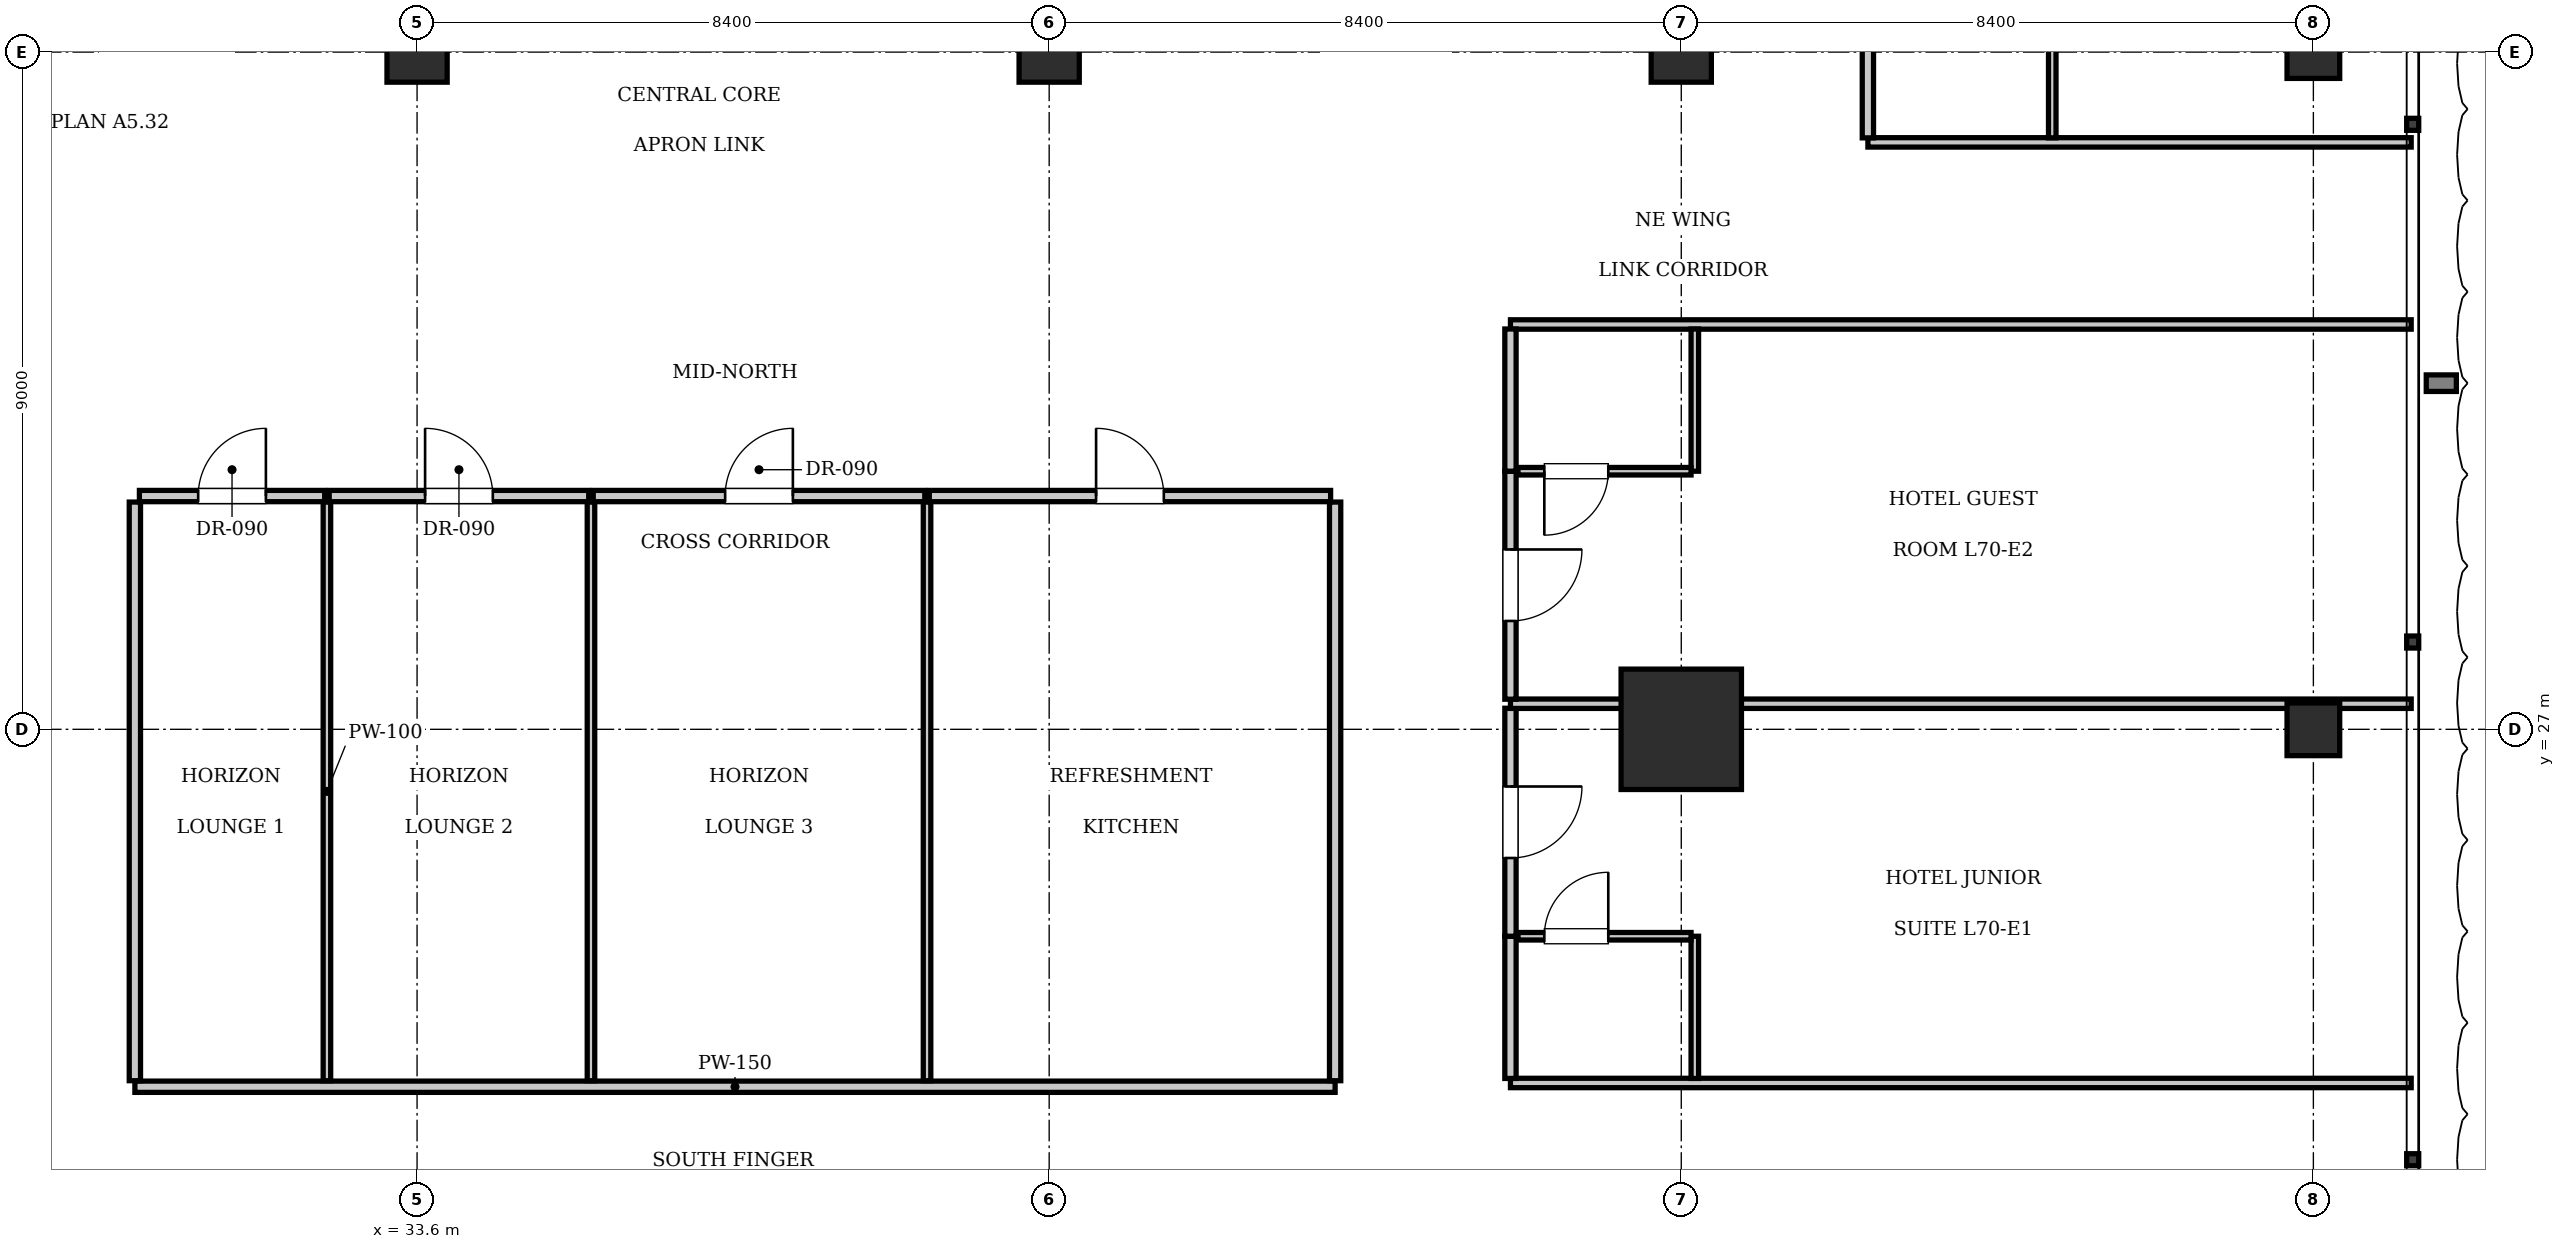
"""IFC4 building model, lengths in metres.
Left out: names, types, materials, properties, quantities, classifications, styles, units other than length and angle.
Written with IfcOpenShell. Run it as: python <this file> out.ifc"""

import sys

from ifc_helpers import new_model, si_unit, direction, frame, frame_2d, origin, origin_2d, place, context, subcontext, project, spatial, rectangle, extrude, element, fill, save


model = new_model("IFC4")
c1 = context("Model", 3, precision=1e-05, world=origin(), true_north=direction((0.0, 1.0)))
c2 = subcontext(c1, "Body", "Model", "MODEL_VIEW")
j1 = project(units=[si_unit("LENGTHUNIT", "METRE"), si_unit("PLANEANGLEUNIT", "RADIAN")], contexts=[c1])
p1 = place(None, origin())
s1 = spatial("IfcSite", under=j1, at=p1, CompositionType="ELEMENT")
p2 = place(p1, origin())
s2 = spatial("IfcBuilding", under=s1, at=p2, CompositionType="ELEMENT")
p3 = place(p2, frame((0.0, 0.0, 285.6)))
s3 = spatial("IfcBuildingStorey", under=s2, at=p3, CompositionType="ELEMENT", Elevation=285.6)
p4 = place(p3, frame((50.4, 27.0, 0.0), z_axis=(0.0, 0.0, 1.0), x_axis=(1.0, 0.0, 0.0)))
e1 = element("IfcColumn", 1, at=p4, inside=s3, PredefinedType="COLUMN", context=c2, shape_type="SweptSolid", body=[
    extrude(rectangle(XDim=1.6, YDim=1.6, at=origin_2d()), origin(), (0.0, 0.0, 1.0), 3.85),
])
for number, where, z_axis, x_axis in (
    (2, (33.6, 36.0, 0.0), (0.0, 0.0, 1.0), (1.0, 0.0, 0.0)),
    (3, (42.0, 36.0, 0.0), (0.0, 0.0, 1.0), (1.0, 0.0, 0.0)),
    (4, (50.4, 36.0, 0.0), (0.0, 0.0, 1.0), (1.0, 0.0, 0.0)),
):
    element("IfcColumn", number, at=place(p3, frame(where, z_axis=z_axis, x_axis=x_axis)), inside=s3, PredefinedType="COLUMN", context=c2, shape_type="SweptSolid", body=[
        extrude(rectangle(XDim=0.8, YDim=0.8, at=origin_2d()), origin(), (0.0, 0.0, 1.0), 3.85),
    ])
for number, where, z_axis, x_axis in (
    (5, (58.8, 27.0, 0.0), (0.0, 0.0, 1.0), (1.0, 0.0, 0.0)),
    (6, (58.8, 36.0, 0.0), (0.0, 0.0, 1.0), (1.0, 0.0, 0.0)),
):
    element("IfcColumn", number, at=place(p3, frame(where, z_axis=z_axis, x_axis=x_axis)), inside=s3, PredefinedType="COLUMN", context=c2, shape_type="SweptSolid", body=[
        extrude(rectangle(XDim=0.7, YDim=0.7, at=origin_2d()), origin(), (0.0, 0.0, 1.0), 3.85),
    ])
p5 = place(p3, frame((29.85, 22.25, 0.0), z_axis=(0.0, 0.0, 1.0), x_axis=(1.0, 0.0, 0.0)))
e7 = element("IfcWall", 7, at=p5, inside=s3, PredefinedType="PARTITIONING", context=c2, shape_type="SweptSolid", body=[
    extrude(rectangle(XDim=15.95, YDim=0.15, at=frame_2d((7.975, 0.0))), origin(), (0.0, 0.0, 1.0), 3.61),
])
for number, where, z_axis, x_axis in (
    (8, (29.85, 22.33, 0.0), (0.0, 0.0, 1.0), (0.0, 1.0, 0.0)),
    (9, (45.8, 22.33, 0.0), (0.0, 0.0, 1.0), (0.0, 1.0, 0.0)),
):
    element("IfcWall", number, at=place(p3, frame(where, z_axis=z_axis, x_axis=x_axis)), inside=s3, PredefinedType="PARTITIONING", context=c2, shape_type="SweptSolid", body=[
        extrude(rectangle(XDim=7.69, YDim=0.15, at=frame_2d((3.845, 0.0))), origin(), (0.0, 0.0, 1.0), 3.61),
    ])
p6 = place(p3, frame((29.91, 30.1, 0.0), z_axis=(0.0, 0.0, 1.0), x_axis=(1.0, 0.0, 0.0)))
e10 = element("IfcWall", 10, at=p6, inside=s3, PredefinedType="PARTITIONING", context=c2, shape_type="SweptSolid", body=[
    extrude(rectangle(XDim=2.462, YDim=0.15, at=frame_2d((1.231, 0.0))), origin(), (0.0, 0.0, 1.0), 3.61),
])
p7 = place(p6, frame((0.781, 0.0, 0.0)))
e11 = element("IfcOpeningElement", 11, at=p7, cuts=e10, PredefinedType="OPENING", context=c2, shape_type="SweptSolid", body=[
    extrude(rectangle(XDim=0.9, YDim=2.1, at=frame_2d((0.45, 1.05))), frame((0.0, 0.085, 0.0), z_axis=(0.0, -1.0, 0.0), x_axis=(1.0, 0.0, 0.0)), (0.0, 0.0, 1.0), 0.17),
])
p8 = place(p3, frame((32.402, 22.33, 0.0), z_axis=(0.0, 0.0, 1.0), x_axis=(0.0, 1.0, 0.0)))
e12 = element("IfcWall", 12, at=p8, inside=s3, PredefinedType="PARTITIONING", context=c2, shape_type="SweptSolid", body=[
    extrude(rectangle(XDim=7.69, YDim=0.1, at=frame_2d((3.845, 0.0))), origin(), (0.0, 0.0, 1.0), 3.61),
])
p9 = place(p3, frame((32.432, 30.1, 0.0), z_axis=(0.0, 0.0, 1.0), x_axis=(1.0, 0.0, 0.0)))
e13 = element("IfcWall", 13, at=p9, inside=s3, PredefinedType="PARTITIONING", context=c2, shape_type="SweptSolid", body=[
    extrude(rectangle(XDim=3.449, YDim=0.15, at=frame_2d((1.725, 0.0))), origin(), (0.0, 0.0, 1.0), 3.61),
])
p10 = place(p9, frame((1.274, 0.0, 0.0)))
e14 = element("IfcOpeningElement", 14, at=p10, cuts=e13, PredefinedType="OPENING", context=c2, shape_type="SweptSolid", body=[
    extrude(rectangle(XDim=0.9, YDim=2.1, at=frame_2d((0.45, 1.05))), frame((0.0, 0.085, 0.0), z_axis=(0.0, -1.0, 0.0), x_axis=(1.0, 0.0, 0.0)), (0.0, 0.0, 1.0), 0.17),
])
p11 = place(p3, frame((35.911, 22.33, 0.0), z_axis=(0.0, 0.0, 1.0), x_axis=(0.0, 1.0, 0.0)))
e15 = element("IfcWall", 15, at=p11, inside=s3, PredefinedType="PARTITIONING", context=c2, shape_type="SweptSolid", body=[
    extrude(rectangle(XDim=7.69, YDim=0.1, at=frame_2d((3.845, 0.0))), origin(), (0.0, 0.0, 1.0), 3.61),
])
p12 = place(p3, frame((35.941, 30.1, 0.0), z_axis=(0.0, 0.0, 1.0), x_axis=(1.0, 0.0, 0.0)))
e16 = element("IfcWall", 16, at=p12, inside=s3, PredefinedType="PARTITIONING", context=c2, shape_type="SweptSolid", body=[
    extrude(rectangle(XDim=4.406, YDim=0.15, at=frame_2d((2.203, 0.0))), origin(), (0.0, 0.0, 1.0), 3.61),
])
p13 = place(p12, frame((1.753, 0.0, 0.0)))
e17 = element("IfcOpeningElement", 17, at=p13, cuts=e16, PredefinedType="OPENING", context=c2, shape_type="SweptSolid", body=[
    extrude(rectangle(XDim=0.9, YDim=2.1, at=frame_2d((0.45, 1.05))), frame((0.0, 0.085, 0.0), z_axis=(0.0, -1.0, 0.0), x_axis=(1.0, 0.0, 0.0)), (0.0, 0.0, 1.0), 0.17),
])
p14 = place(p3, frame((40.377, 22.33, 0.0), z_axis=(0.0, 0.0, 1.0), x_axis=(0.0, 1.0, 0.0)))
e18 = element("IfcWall", 18, at=p14, inside=s3, PredefinedType="PARTITIONING", context=c2, shape_type="SweptSolid", body=[
    extrude(rectangle(XDim=7.69, YDim=0.1, at=frame_2d((3.845, 0.0))), origin(), (0.0, 0.0, 1.0), 3.61),
])
p15 = place(p3, frame((40.407, 30.1, 0.0), z_axis=(0.0, 0.0, 1.0), x_axis=(1.0, 0.0, 0.0)))
e19 = element("IfcWall", 19, at=p15, inside=s3, PredefinedType="PARTITIONING", context=c2, shape_type="SweptSolid", body=[
    extrude(rectangle(XDim=5.333, YDim=0.15, at=frame_2d((2.667, 0.0))), origin(), (0.0, 0.0, 1.0), 3.61),
])
p16 = place(p15, frame((2.217, 0.0, 0.0)))
e20 = element("IfcOpeningElement", 20, at=p16, cuts=e19, PredefinedType="OPENING", context=c2, shape_type="SweptSolid", body=[
    extrude(rectangle(XDim=0.9, YDim=2.1, at=frame_2d((0.45, 1.05))), frame((0.0, 0.085, 0.0), z_axis=(0.0, -1.0, 0.0), x_axis=(1.0, 0.0, 0.0)), (0.0, 0.0, 1.0), 0.17),
])
for number, where, z_axis, x_axis in (
    (21, (48.13, 22.3, 0.0), (0.0, 0.0, 1.0), (1.0, 0.0, 0.0)),
    (22, (48.13, 32.38, 0.0), (0.0, 0.0, 1.0), (1.0, 0.0, 0.0)),
):
    element("IfcWall", number, at=place(p3, frame(where, z_axis=z_axis, x_axis=x_axis)), inside=s3, PredefinedType="PARTITIONING", context=c2, shape_type="SweptSolid", body=[
        extrude(rectangle(XDim=11.97, YDim=0.125, at=frame_2d((5.985, 0.0))), origin(), (0.0, 0.0, 1.0), 3.61),
    ])
p17 = place(p3, frame((48.13, 22.36, 0.0), z_axis=(0.0, 0.0, 1.0), x_axis=(0.0, 1.0, 0.0)))
e23 = element("IfcWall", 23, at=p17, inside=s3, PredefinedType="PARTITIONING", context=c2, shape_type="SweptSolid", body=[
    extrude(rectangle(XDim=1.89, YDim=0.15, at=frame_2d((0.945, 0.0))), origin(), (0.0, 0.0, 1.0), 3.61),
])
p18 = place(p3, frame((48.13, 24.25, 0.0), z_axis=(0.0, 0.0, 1.0), x_axis=(0.0, 1.0, 0.0)))
e24 = element("IfcWall", 24, at=p18, inside=s3, PredefinedType="PARTITIONING", context=c2, shape_type="SweptSolid", body=[
    extrude(rectangle(XDim=3.03, YDim=0.15, at=frame_2d((1.515, 0.0))), origin(), (0.0, 0.0, 1.0), 3.61),
])
p19 = place(p18, frame((1.04, 0.0, 0.0)))
e25 = element("IfcOpeningElement", 25, at=p19, cuts=e24, PredefinedType="OPENING", context=c2, shape_type="SweptSolid", body=[
    extrude(rectangle(XDim=0.95, YDim=2.15, at=frame_2d((0.475, 1.075))), frame((0.0, 0.085, 0.0), z_axis=(0.0, -1.0, 0.0), x_axis=(1.0, 0.0, 0.0)), (0.0, 0.0, 1.0), 0.17),
])
p20 = place(p3, frame((50.58, 22.36, 0.0), z_axis=(0.0, 0.0, 1.0), x_axis=(0.0, 1.0, 0.0)))
e26 = element("IfcWall", 26, at=p20, inside=s3, PredefinedType="PARTITIONING", context=c2, shape_type="SweptSolid", body=[
    extrude(rectangle(XDim=1.89, YDim=0.1, at=frame_2d((0.945, 0.0))), origin(), (0.0, 0.0, 1.0), 3.61),
])
p21 = place(p3, frame((48.23, 24.25, 0.0), z_axis=(0.0, 0.0, 1.0), x_axis=(1.0, 0.0, 0.0)))
e27 = element("IfcWall", 27, at=p21, inside=s3, PredefinedType="PARTITIONING", context=c2, shape_type="SweptSolid", body=[
    extrude(rectangle(XDim=2.3, YDim=0.1, at=frame_2d((1.15, 0.0))), origin(), (0.0, 0.0, 1.0), 3.61),
])
p22 = place(p21, frame((0.35, 0.0, 0.0)))
e28 = element("IfcOpeningElement", 28, at=p22, cuts=e27, PredefinedType="OPENING", context=c2, shape_type="SweptSolid", body=[
    extrude(rectangle(XDim=0.85, YDim=2.1, at=frame_2d((0.425, 1.05))), frame((0.0, 0.06, 0.0), z_axis=(0.0, -1.0, 0.0), x_axis=(1.0, 0.0, 0.0)), (0.0, 0.0, 1.0), 0.12),
])
p23 = place(p3, frame((48.13, 27.34, 0.0), z_axis=(0.0, 0.0, 1.0), x_axis=(1.0, 0.0, 0.0)))
e29 = element("IfcWall", 29, at=p23, inside=s3, PredefinedType="PARTITIONING", context=c2, shape_type="SweptSolid", body=[
    extrude(rectangle(XDim=11.97, YDim=0.125, at=frame_2d((5.985, 0.0))), origin(), (0.0, 0.0, 1.0), 3.61),
])
p24 = place(p3, frame((48.13, 27.4, 0.0), z_axis=(0.0, 0.0, 1.0), x_axis=(0.0, 1.0, 0.0)))
e30 = element("IfcWall", 30, at=p24, inside=s3, PredefinedType="PARTITIONING", context=c2, shape_type="SweptSolid", body=[
    extrude(rectangle(XDim=3.03, YDim=0.15, at=frame_2d((1.515, 0.0))), origin(), (0.0, 0.0, 1.0), 3.61),
])
p25 = place(p24, frame((1.04, 0.0, 0.0)))
e31 = element("IfcOpeningElement", 31, at=p25, cuts=e30, PredefinedType="OPENING", context=c2, shape_type="SweptSolid", body=[
    extrude(rectangle(XDim=0.95, YDim=2.15, at=frame_2d((0.475, 1.075))), frame((0.0, 0.085, 0.0), z_axis=(0.0, -1.0, 0.0), x_axis=(1.0, 0.0, 0.0)), (0.0, 0.0, 1.0), 0.17),
])
p26 = place(p3, frame((48.13, 30.43, 0.0), z_axis=(0.0, 0.0, 1.0), x_axis=(0.0, 1.0, 0.0)))
e32 = element("IfcWall", 32, at=p26, inside=s3, PredefinedType="PARTITIONING", context=c2, shape_type="SweptSolid", body=[
    extrude(rectangle(XDim=1.89, YDim=0.15, at=frame_2d((0.945, 0.0))), origin(), (0.0, 0.0, 1.0), 3.61),
])
p27 = place(p3, frame((50.58, 30.43, 0.0), z_axis=(0.0, 0.0, 1.0), x_axis=(0.0, 1.0, 0.0)))
e33 = element("IfcWall", 33, at=p27, inside=s3, PredefinedType="PARTITIONING", context=c2, shape_type="SweptSolid", body=[
    extrude(rectangle(XDim=1.89, YDim=0.1, at=frame_2d((0.945, 0.0))), origin(), (0.0, 0.0, 1.0), 3.61),
])
p28 = place(p3, frame((48.23, 30.43, 0.0), z_axis=(0.0, 0.0, 1.0), x_axis=(1.0, 0.0, 0.0)))
e34 = element("IfcWall", 34, at=p28, inside=s3, PredefinedType="PARTITIONING", context=c2, shape_type="SweptSolid", body=[
    extrude(rectangle(XDim=2.3, YDim=0.1, at=frame_2d((1.15, 0.0))), origin(), (0.0, 0.0, 1.0), 3.61),
])
p29 = place(p28, frame((0.35, 0.0, 0.0)))
e35 = element("IfcOpeningElement", 35, at=p29, cuts=e34, PredefinedType="OPENING", context=c2, shape_type="SweptSolid", body=[
    extrude(rectangle(XDim=0.85, YDim=2.1, at=frame_2d((0.425, 1.05))), frame((0.0, 0.06, 0.0), z_axis=(0.0, -1.0, 0.0), x_axis=(1.0, 0.0, 0.0)), (0.0, 0.0, 1.0), 0.12),
])
p30 = place(p3, frame((52.88, 34.8, 0.0), z_axis=(0.0, 0.0, 1.0), x_axis=(1.0, 0.0, 0.0)))
e36 = element("IfcWall", 36, at=p30, inside=s3, PredefinedType="PARTITIONING", context=c2, shape_type="SweptSolid", body=[
    extrude(rectangle(XDim=7.22, YDim=0.125, at=frame_2d((3.61, 0.0))), origin(), (0.0, 0.0, 1.0), 3.61),
])
p31 = place(p3, frame((52.88, 34.86, 0.0), z_axis=(0.0, 0.0, 1.0), x_axis=(0.0, 1.0, 0.0)))
e37 = element("IfcWall", 37, at=p31, inside=s3, PredefinedType="PARTITIONING", context=c2, shape_type="SweptSolid", body=[
    extrude(rectangle(XDim=1.89, YDim=0.15, at=frame_2d((0.945, 0.0))), origin(), (0.0, 0.0, 1.0), 3.61),
])
p32 = place(p3, frame((55.33, 34.86, 0.0), z_axis=(0.0, 0.0, 1.0), x_axis=(0.0, 1.0, 0.0)))
e38 = element("IfcWall", 38, at=p32, inside=s3, PredefinedType="PARTITIONING", context=c2, shape_type="SweptSolid", body=[
    extrude(rectangle(XDim=1.89, YDim=0.1, at=frame_2d((0.945, 0.0))), origin(), (0.0, 0.0, 1.0), 3.61),
])
p33 = place(p7, origin())
e39 = element("IfcDoor", 39, at=p33, inside=s3, OperationType="SINGLE_SWING_RIGHT", PredefinedType="DOOR", context=c2, shape_type="SweptSolid", body=[
    extrude(rectangle(XDim=0.9, YDim=2.1, at=frame_2d((0.45, 1.05))), frame((0.0, 0.025, 0.0), z_axis=(0.0, -1.0, 0.0), x_axis=(1.0, 0.0, 0.0)), (0.0, 0.0, 1.0), 0.05),
])
fill(e11, e39)
p34 = place(p10, origin())
e40 = element("IfcDoor", 40, at=p34, inside=s3, OperationType="SINGLE_SWING_LEFT", PredefinedType="DOOR", context=c2, shape_type="SweptSolid", body=[
    extrude(rectangle(XDim=0.9, YDim=2.1, at=frame_2d((0.45, 1.05))), frame((0.0, 0.025, 0.0), z_axis=(0.0, -1.0, 0.0), x_axis=(1.0, 0.0, 0.0)), (0.0, 0.0, 1.0), 0.05),
])
fill(e14, e40)
p35 = place(p13, origin())
e41 = element("IfcDoor", 41, at=p35, inside=s3, OperationType="SINGLE_SWING_RIGHT", PredefinedType="DOOR", context=c2, shape_type="SweptSolid", body=[
    extrude(rectangle(XDim=0.9, YDim=2.1, at=frame_2d((0.45, 1.05))), frame((0.0, 0.025, 0.0), z_axis=(0.0, -1.0, 0.0), x_axis=(1.0, 0.0, 0.0)), (0.0, 0.0, 1.0), 0.05),
])
fill(e17, e41)
p36 = place(p16, origin())
e42 = element("IfcDoor", 42, at=p36, inside=s3, OperationType="SINGLE_SWING_LEFT", PredefinedType="DOOR", context=c2, shape_type="SweptSolid", body=[
    extrude(rectangle(XDim=0.9, YDim=2.1, at=frame_2d((0.45, 1.05))), frame((0.0, 0.025, 0.0), z_axis=(0.0, -1.0, 0.0), x_axis=(1.0, 0.0, 0.0)), (0.0, 0.0, 1.0), 0.05),
])
fill(e20, e42)
p37 = place(p22, origin())
e43 = element("IfcDoor", 43, at=p37, inside=s3, OperationType="SINGLE_SWING_RIGHT", PredefinedType="DOOR", context=c2, shape_type="SweptSolid", body=[
    extrude(rectangle(XDim=0.85, YDim=2.1, at=frame_2d((0.425, 1.05))), frame((0.0, 0.025, 0.0), z_axis=(0.0, -1.0, 0.0), x_axis=(1.0, 0.0, 0.0)), (0.0, 0.0, 1.0), 0.05),
])
fill(e28, e43)
p38 = place(p19, frame((0.95, 0.0, 0.0), z_axis=(0.0, 0.0, 1.0), x_axis=(-1.0, 0.0, 0.0)))
e44 = element("IfcDoor", 44, at=p38, inside=s3, OperationType="SINGLE_SWING_LEFT", PredefinedType="DOOR", context=c2, shape_type="SweptSolid", body=[
    extrude(rectangle(XDim=0.95, YDim=2.15, at=frame_2d((0.475, 1.075))), frame((0.0, 0.025, 0.0), z_axis=(0.0, -1.0, 0.0), x_axis=(1.0, 0.0, 0.0)), (0.0, 0.0, 1.0), 0.05),
])
fill(e25, e44)
p39 = place(p29, frame((0.85, 0.0, 0.0), z_axis=(0.0, 0.0, 1.0), x_axis=(-1.0, 0.0, 0.0)))
e45 = element("IfcDoor", 45, at=p39, inside=s3, OperationType="SINGLE_SWING_RIGHT", PredefinedType="DOOR", context=c2, shape_type="SweptSolid", body=[
    extrude(rectangle(XDim=0.85, YDim=2.1, at=frame_2d((0.425, 1.05))), frame((0.0, 0.025, 0.0), z_axis=(0.0, -1.0, 0.0), x_axis=(1.0, 0.0, 0.0)), (0.0, 0.0, 1.0), 0.05),
])
fill(e35, e45)
p40 = place(p25, frame((0.95, 0.0, 0.0), z_axis=(0.0, 0.0, 1.0), x_axis=(-1.0, 0.0, 0.0)))
e46 = element("IfcDoor", 46, at=p40, inside=s3, OperationType="SINGLE_SWING_LEFT", PredefinedType="DOOR", context=c2, shape_type="SweptSolid", body=[
    extrude(rectangle(XDim=0.95, YDim=2.15, at=frame_2d((0.475, 1.075))), frame((0.0, 0.025, 0.0), z_axis=(0.0, -1.0, 0.0), x_axis=(1.0, 0.0, 0.0)), (0.0, 0.0, 1.0), 0.05),
])
fill(e31, e46)
save(model, sys.argv[1])
